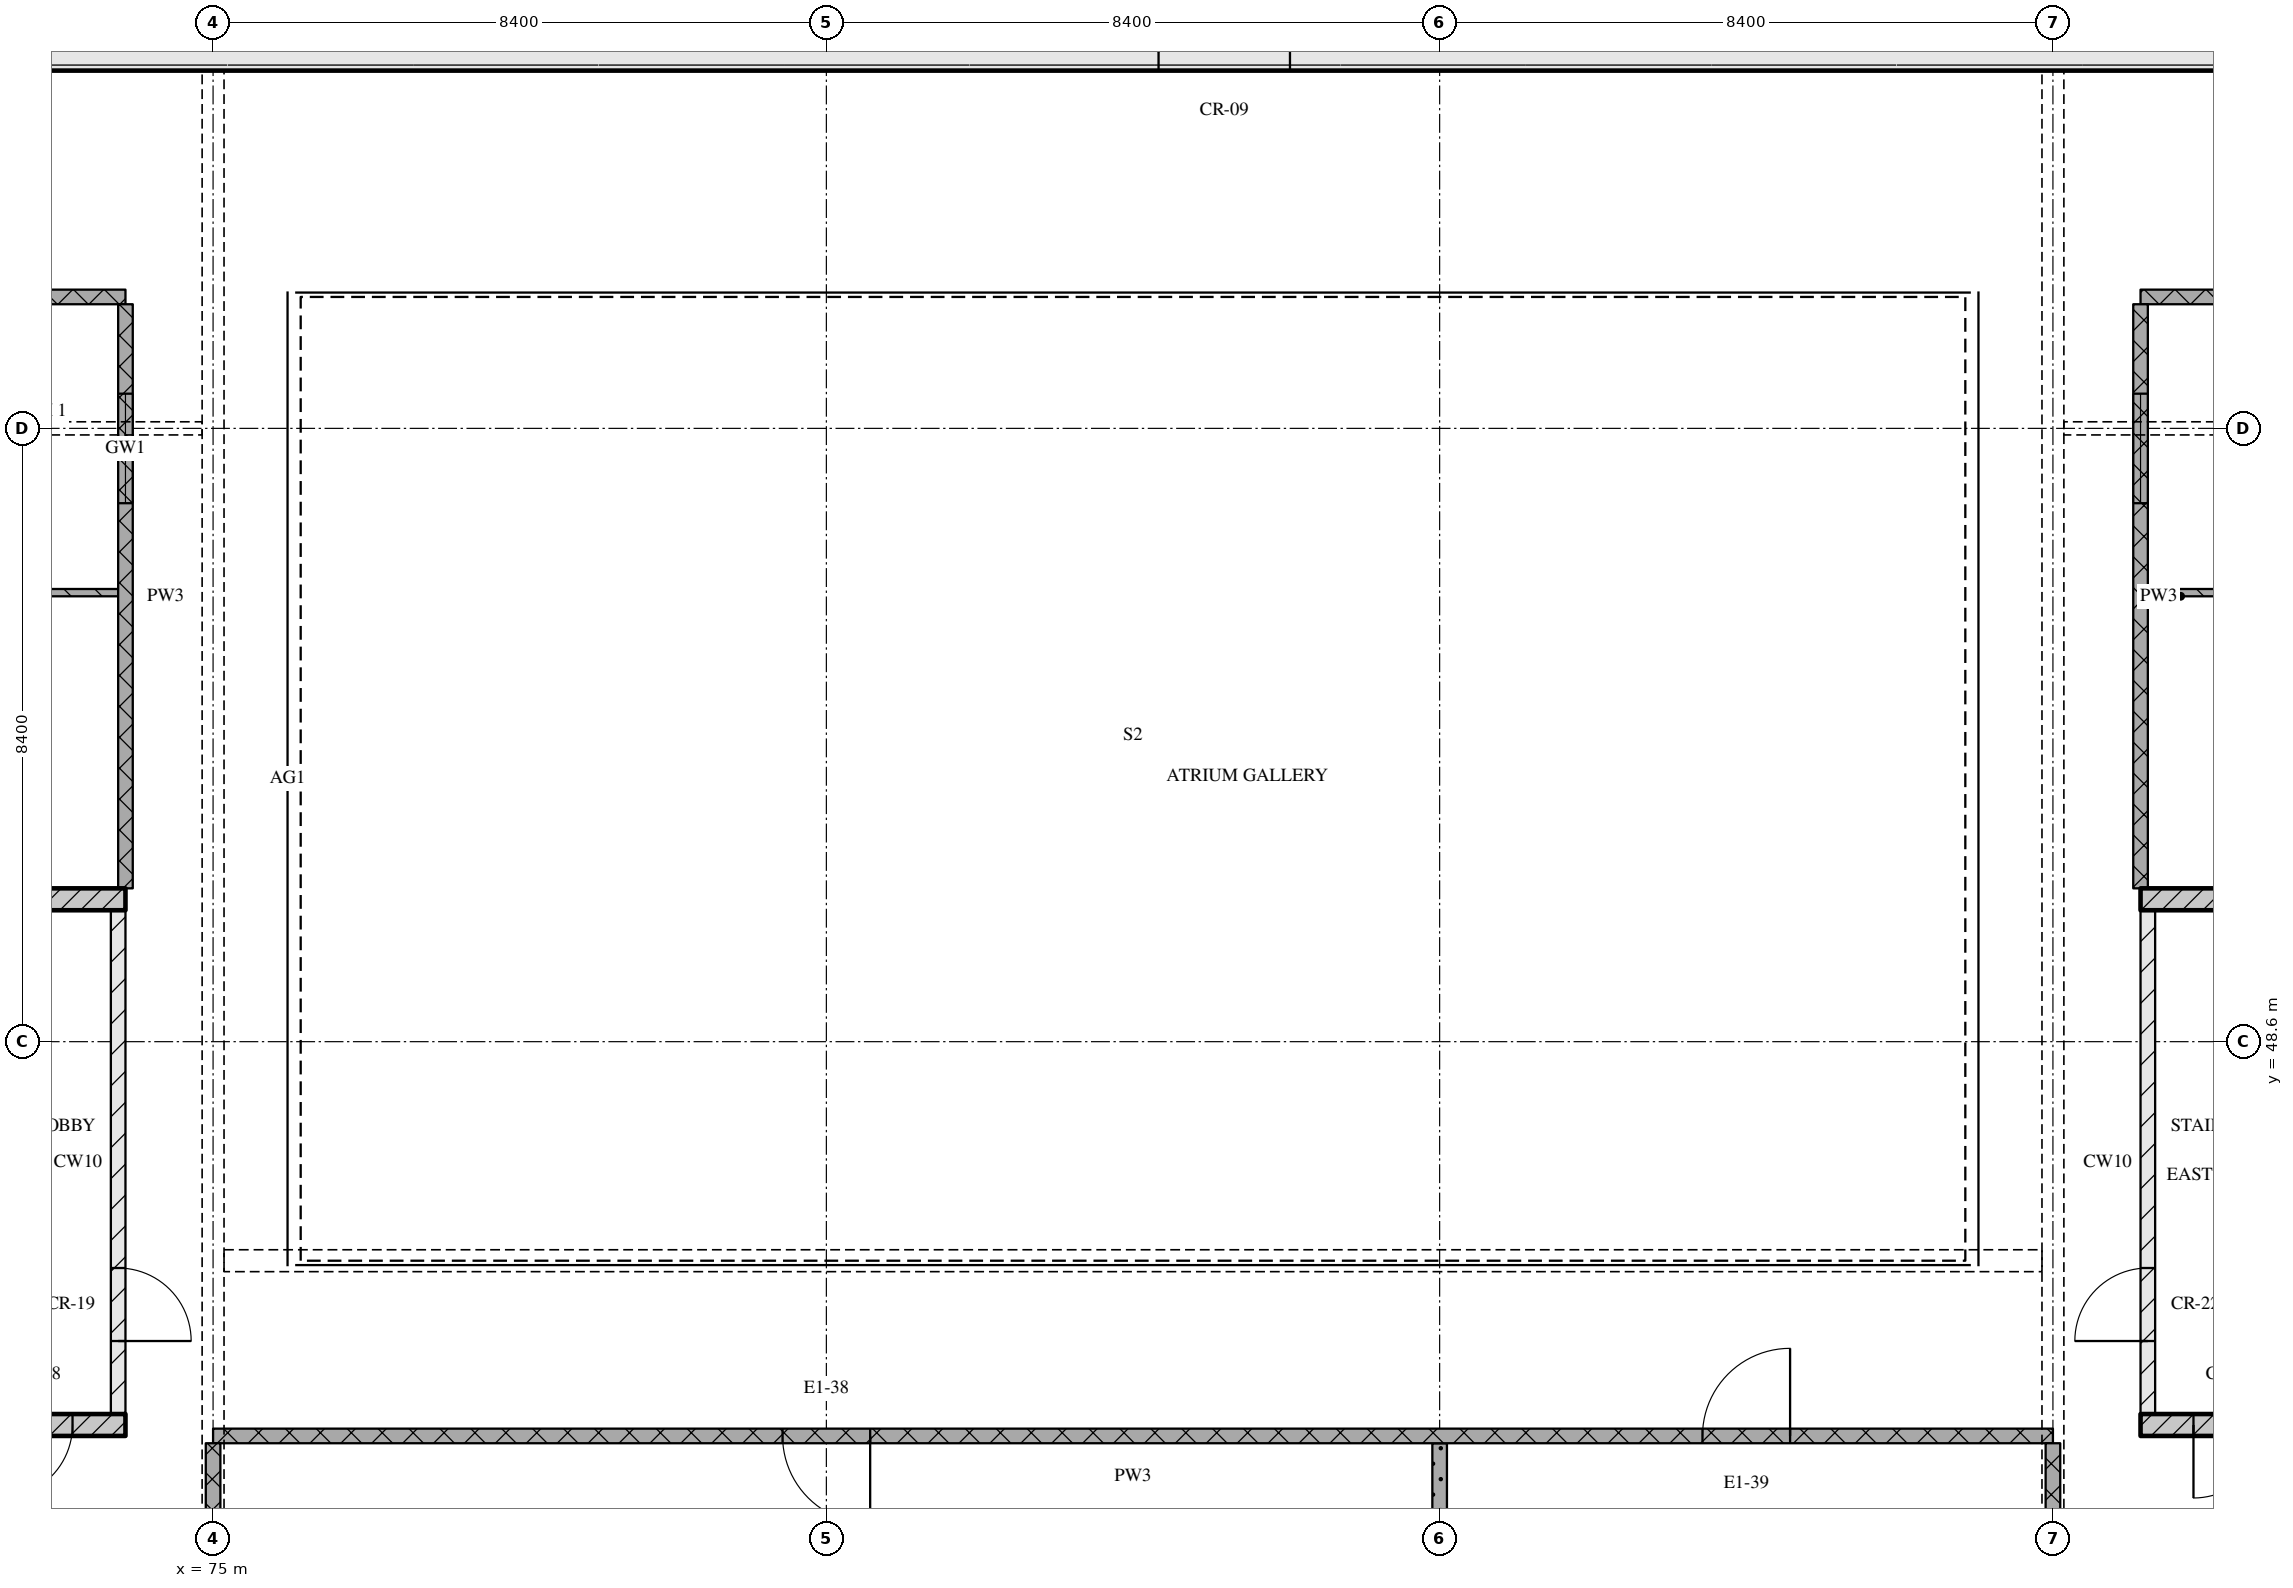
"""IFC4 building model, lengths in metres.
Left out: names, types, materials, properties, quantities, classifications, styles, units other than length and angle.
Written with IfcOpenShell. Run it as: python <this file> out.ifc"""

import sys

from ifc_helpers import new_model, si_unit, direction, frame, frame_2d, origin, place, context, subcontext, project, spatial, rectangle, extrude, element, fill, save


model = new_model("IFC4")
c1 = context("Model", 3, precision=1e-05, world=origin(), true_north=direction((0.0, 1.0)))
c2 = subcontext(c1, "Body", "Model", "MODEL_VIEW")
j1 = project(units=[si_unit("LENGTHUNIT", "METRE"), si_unit("PLANEANGLEUNIT", "RADIAN")], contexts=[c1])
p1 = place(None, origin())
s1 = spatial("IfcSite", under=j1, at=p1, CompositionType="ELEMENT")
p2 = place(p1, origin())
s2 = spatial("IfcBuilding", under=s1, at=p2, CompositionType="ELEMENT")
p3 = place(p2, frame((0.0, 0.0, 263.55)))
s3 = spatial("IfcBuildingStorey", under=s2, at=p3, CompositionType="ELEMENT", Elevation=263.55)
p4 = place(p3, frame((67.3, 62.15, 0.0), z_axis=(0.0, 0.0, 1.0), x_axis=(1.0, 0.0, 0.0)))
e1 = element("IfcWall", 1, at=p4, inside=s3, PredefinedType="SOLIDWALL", context=c2, shape_type="SweptSolid", body=[
    extrude(rectangle(XDim=40.6, YDim=0.5, at=frame_2d((20.3, 0.0))), origin(), (0.0, 0.0, 1.0), 3.32),
])
p5 = place(p4, frame((20.65, 0.0, 0.0)))
e2 = element("IfcOpeningElement", 2, at=p5, cuts=e1, PredefinedType="OPENING", context=c2, shape_type="SweptSolid", body=[
    extrude(rectangle(XDim=1.8, YDim=2.1, at=frame_2d((0.9, 1.05))), frame((0.0, 0.26, 0.0), z_axis=(0.0, -1.0, 0.0), x_axis=(1.0, 0.0, 0.0)), (0.0, 0.0, 1.0), 0.52),
])
p6 = place(p3, frame((68.2, 43.35, 0.0), z_axis=(0.0, 0.0, 1.0), x_axis=(1.0, 0.0, 0.0)))
e3 = element("IfcWall", 3, at=p6, inside=s3, PredefinedType="SOLIDWALL", context=c2, shape_type="SweptSolid", body=[
    extrude(rectangle(XDim=5.6, YDim=0.3, at=frame_2d((2.8, 0.0))), origin(), (0.0, 0.0, 1.0), 3.32),
])
p7 = place(p6, frame((3.875, 0.0, 0.0)))
e4 = element("IfcOpeningElement", 4, at=p7, cuts=e3, PredefinedType="OPENING", context=c2, shape_type="SweptSolid", body=[
    extrude(rectangle(XDim=1.0, YDim=2.1, at=frame_2d((0.5, 1.05))), frame((0.0, 0.16, 0.0), z_axis=(0.0, -1.0, 0.0), x_axis=(1.0, 0.0, 0.0)), (0.0, 0.0, 1.0), 0.32),
])
p8 = place(p3, frame((73.7, 43.5, 0.0), z_axis=(0.0, 0.0, 1.0), x_axis=(0.0, 1.0, 0.0)))
e5 = element("IfcWall", 5, at=p8, inside=s3, PredefinedType="PARTITIONING", context=c2, shape_type="SweptSolid", body=[
    extrude(rectangle(XDim=6.9, YDim=0.2, at=frame_2d((3.45, 0.0))), origin(), (0.0, 0.0, 1.0), 3.32),
])
p9 = place(p8, frame((1.0, 0.0, 0.0)))
e6 = element("IfcOpeningElement", 6, at=p9, cuts=e5, PredefinedType="OPENING", context=c2, shape_type="SweptSolid", body=[
    extrude(rectangle(XDim=1.0, YDim=2.1, at=frame_2d((0.5, 1.05))), frame((0.0, 0.11, 0.0), z_axis=(0.0, -1.0, 0.0), x_axis=(1.0, 0.0, 0.0)), (0.0, 0.0, 1.0), 0.22),
])
p10 = place(p3, frame((68.2, 50.55, 0.0), z_axis=(0.0, 0.0, 1.0), x_axis=(1.0, 0.0, 0.0)))
e7 = element("IfcWall", 7, at=p10, inside=s3, PredefinedType="SOLIDWALL", context=c2, shape_type="SweptSolid", body=[
    extrude(rectangle(XDim=5.6, YDim=0.3, at=frame_2d((2.8, 0.0))), origin(), (0.0, 0.0, 1.0), 3.32),
])
p11 = place(p3, frame((101.4, 43.35, 0.0), z_axis=(0.0, 0.0, 1.0), x_axis=(1.0, 0.0, 0.0)))
e8 = element("IfcWall", 8, at=p11, inside=s3, PredefinedType="SOLIDWALL", context=c2, shape_type="SweptSolid", body=[
    extrude(rectangle(XDim=5.6, YDim=0.3, at=frame_2d((2.8, 0.0))), origin(), (0.0, 0.0, 1.0), 3.32),
])
p12 = place(p11, frame((0.725, 0.0, 0.0)))
e9 = element("IfcOpeningElement", 9, at=p12, cuts=e8, PredefinedType="OPENING", context=c2, shape_type="SweptSolid", body=[
    extrude(rectangle(XDim=1.0, YDim=2.1, at=frame_2d((0.5, 1.05))), frame((0.0, 0.16, 0.0), z_axis=(0.0, -1.0, 0.0), x_axis=(1.0, 0.0, 0.0)), (0.0, 0.0, 1.0), 0.32),
])
p13 = place(p3, frame((101.5, 43.5, 0.0), z_axis=(0.0, 0.0, 1.0), x_axis=(0.0, 1.0, 0.0)))
e10 = element("IfcWall", 10, at=p13, inside=s3, PredefinedType="PARTITIONING", context=c2, shape_type="SweptSolid", body=[
    extrude(rectangle(XDim=6.9, YDim=0.2, at=frame_2d((3.45, 0.0))), origin(), (0.0, 0.0, 1.0), 3.32),
])
p14 = place(p13, frame((1.0, 0.0, 0.0)))
e11 = element("IfcOpeningElement", 11, at=p14, cuts=e10, PredefinedType="OPENING", context=c2, shape_type="SweptSolid", body=[
    extrude(rectangle(XDim=1.0, YDim=2.1, at=frame_2d((0.5, 1.05))), frame((0.0, 0.11, 0.0), z_axis=(0.0, -1.0, 0.0), x_axis=(1.0, 0.0, 0.0)), (0.0, 0.0, 1.0), 0.22),
])
p15 = place(p3, frame((101.4, 50.55, 0.0), z_axis=(0.0, 0.0, 1.0), x_axis=(1.0, 0.0, 0.0)))
e12 = element("IfcWall", 12, at=p15, inside=s3, PredefinedType="SOLIDWALL", context=c2, shape_type="SweptSolid", body=[
    extrude(rectangle(XDim=5.6, YDim=0.3, at=frame_2d((2.8, 0.0))), origin(), (0.0, 0.0, 1.0), 3.32),
])
p16 = place(p3, frame((100.2, 43.2, 0.0), z_axis=(0.0, 0.0, 1.0), x_axis=(-1.0, 0.0, 0.0)))
e13 = element("IfcWall", 13, at=p16, inside=s3, PredefinedType="PARTITIONING", context=c2, shape_type="SweptSolid", body=[
    extrude(rectangle(XDim=25.2, YDim=0.2, at=frame_2d((12.6, 0.0))), origin(), (0.0, 0.0, 1.0), 3.32),
])
p17 = place(p16, frame((3.6, 0.0, 0.0)))
e14 = element("IfcOpeningElement", 14, at=p17, cuts=e13, PredefinedType="OPENING", context=c2, shape_type="SweptSolid", body=[
    extrude(rectangle(XDim=1.2, YDim=2.1, at=frame_2d((0.6, 1.05))), frame((0.0, 0.11, 0.0), z_axis=(0.0, -1.0, 0.0), x_axis=(1.0, 0.0, 0.0)), (0.0, 0.0, 1.0), 0.22),
])
p18 = place(p16, frame((16.2, 0.0, 0.0)))
e15 = element("IfcOpeningElement", 15, at=p18, cuts=e13, PredefinedType="OPENING", context=c2, shape_type="SweptSolid", body=[
    extrude(rectangle(XDim=1.2, YDim=2.1, at=frame_2d((0.6, 1.05))), frame((0.0, 0.11, 0.0), z_axis=(0.0, -1.0, 0.0), x_axis=(1.0, 0.0, 0.0)), (0.0, 0.0, 1.0), 0.22),
])
p19 = place(p3, frame((69.3, 54.75, 0.0), z_axis=(0.0, 0.0, 1.0), x_axis=(1.0, 0.0, 0.0)))
e16 = element("IfcWall", 16, at=p19, inside=s3, PredefinedType="PARTITIONING", context=c2, shape_type="SweptSolid", body=[
    extrude(rectangle(XDim=4.4, YDim=0.1, at=frame_2d((2.2, 0.0))), origin(), (0.0, 0.0, 1.0), 3.32),
])
p20 = place(p3, frame((101.5, 54.75, 0.0), z_axis=(0.0, 0.0, 1.0), x_axis=(1.0, 0.0, 0.0)))
e17 = element("IfcWall", 17, at=p20, inside=s3, PredefinedType="PARTITIONING", context=c2, shape_type="SweptSolid", body=[
    extrude(rectangle(XDim=4.4, YDim=0.1, at=frame_2d((2.2, 0.0))), origin(), (0.0, 0.0, 1.0), 3.32),
])
p21 = place(p20, frame((1.7, 0.0, 0.0)))
e18 = element("IfcOpeningElement", 18, at=p21, cuts=e17, PredefinedType="OPENING", context=c2, shape_type="SweptSolid", body=[
    extrude(rectangle(XDim=0.9, YDim=2.1, at=frame_2d((0.45, 1.05))), frame((0.0, 0.06, 0.0), z_axis=(0.0, -1.0, 0.0), x_axis=(1.0, 0.0, 0.0)), (0.0, 0.0, 1.0), 0.12),
])
for number, where, z_axis, x_axis in (
    (19, (63.0, 58.8, 0.0), (0.0, 0.0, 1.0), (1.0, 0.0, 0.0)),
    (20, (101.4, 58.8, 0.0), (0.0, 0.0, 1.0), (1.0, 0.0, 0.0)),
):
    element("IfcWall", number, at=place(p3, frame(where, z_axis=z_axis, x_axis=x_axis)), inside=s3, PredefinedType="PARTITIONING", context=c2, shape_type="SweptSolid", body=[
        extrude(rectangle(XDim=10.8, YDim=0.2, at=frame_2d((5.4, 0.0))), origin(), (0.0, 0.0, 1.0), 3.32),
    ])
p22 = place(p3, frame((73.8, 58.7, 0.0), z_axis=(0.0, 0.0, 1.0), x_axis=(0.0, -1.0, 0.0)))
e21 = element("IfcWall", 21, at=p22, inside=s3, PredefinedType="PARTITIONING", context=c2, shape_type="SweptSolid", body=[
    extrude(rectangle(XDim=8.0, YDim=0.2, at=frame_2d((4.0, 0.0))), origin(), (0.0, 0.0, 1.0), 3.32),
])
p23 = place(p22, frame((1.225, 0.0, 0.9)))
e22 = element("IfcOpeningElement", 22, at=p23, cuts=e21, PredefinedType="OPENING", context=c2, shape_type="SweptSolid", body=[
    extrude(rectangle(XDim=1.5, YDim=1.5, at=frame_2d((0.75, 0.75))), frame((0.0, 0.11, 0.0), z_axis=(0.0, -1.0, 0.0), x_axis=(1.0, 0.0, 0.0)), (0.0, 0.0, 1.0), 0.22),
])
p24 = place(p3, frame((75.0, 43.1, 0.0), z_axis=(0.0, 0.0, 1.0), x_axis=(0.0, -1.0, 0.0)))
e23 = element("IfcWall", 23, at=p24, inside=s3, PredefinedType="PARTITIONING", context=c2, shape_type="SweptSolid", body=[
    extrude(rectangle(XDim=2.2, YDim=0.2, at=frame_2d((1.1, 0.0))), origin(), (0.0, 0.0, 1.0), 2.53),
])
p25 = place(p3, frame((91.8, 43.1, 0.0), z_axis=(0.0, 0.0, 1.0), x_axis=(0.0, -1.0, 0.0)))
e24 = element("IfcWall", 24, at=p25, inside=s3, PredefinedType="PARTITIONING", context=c2, shape_type="SweptSolid", body=[
    extrude(rectangle(XDim=2.63, YDim=0.2, at=frame_2d((1.315, 0.0))), origin(), (0.0, 0.0, 1.0), 3.32),
])
p26 = place(p3, frame((100.2, 43.1, 0.0), z_axis=(0.0, 0.0, 1.0), x_axis=(0.0, -1.0, 0.0)))
e25 = element("IfcWall", 25, at=p26, inside=s3, PredefinedType="PARTITIONING", context=c2, shape_type="SweptSolid", body=[
    extrude(rectangle(XDim=2.2, YDim=0.2, at=frame_2d((1.1, 0.0))), origin(), (0.0, 0.0, 1.0), 2.53),
])
p27 = place(p3, frame((101.4, 58.7, 0.0), z_axis=(0.0, 0.0, 1.0), x_axis=(0.0, -1.0, 0.0)))
e26 = element("IfcWall", 26, at=p27, inside=s3, PredefinedType="PARTITIONING", context=c2, shape_type="SweptSolid", body=[
    extrude(rectangle(XDim=8.0, YDim=0.2, at=frame_2d((4.0, 0.0))), origin(), (0.0, 0.0, 1.0), 3.32),
])
p28 = place(p27, frame((1.225, 0.0, 0.9)))
e27 = element("IfcOpeningElement", 27, at=p28, cuts=e26, PredefinedType="OPENING", context=c2, shape_type="SweptSolid", body=[
    extrude(rectangle(XDim=1.5, YDim=1.5, at=frame_2d((0.75, 0.75))), frame((0.0, 0.11, 0.0), z_axis=(0.0, -1.0, 0.0), x_axis=(1.0, 0.0, 0.0)), (0.0, 0.0, 1.0), 0.22),
])
p29 = place(p5, origin())
e28 = element("IfcDoor", 28, at=p29, inside=s3, OperationType="DOUBLE_DOOR_SINGLE_SWING", PredefinedType="DOOR", context=c2, shape_type="SweptSolid", body=[
    extrude(rectangle(XDim=1.8, YDim=2.1, at=frame_2d((0.9, 1.05))), frame((0.0, 0.025, 0.0), z_axis=(0.0, -1.0, 0.0), x_axis=(1.0, 0.0, 0.0)), (0.0, 0.0, 1.0), 0.05),
])
fill(e2, e28)
p30 = place(p7, origin())
e29 = element("IfcDoor", 29, at=p30, inside=s3, OperationType="SINGLE_SWING_RIGHT", PredefinedType="DOOR", context=c2, shape_type="SweptSolid", body=[
    extrude(rectangle(XDim=1.0, YDim=2.1, at=frame_2d((0.5, 1.05))), frame((0.0, 0.025, 0.0), z_axis=(0.0, -1.0, 0.0), x_axis=(1.0, 0.0, 0.0)), (0.0, 0.0, 1.0), 0.05),
])
fill(e4, e29)
p31 = place(p9, origin())
e30 = element("IfcDoor", 30, at=p31, inside=s3, OperationType="SINGLE_SWING_RIGHT", PredefinedType="DOOR", context=c2, shape_type="SweptSolid", body=[
    extrude(rectangle(XDim=1.0, YDim=2.1, at=frame_2d((0.5, 1.05))), frame((0.0, 0.025, 0.0), z_axis=(0.0, -1.0, 0.0), x_axis=(1.0, 0.0, 0.0)), (0.0, 0.0, 1.0), 0.05),
])
fill(e6, e30)
p32 = place(p12, origin())
e31 = element("IfcDoor", 31, at=p32, inside=s3, OperationType="SINGLE_SWING_RIGHT", PredefinedType="DOOR", context=c2, shape_type="SweptSolid", body=[
    extrude(rectangle(XDim=1.0, YDim=2.1, at=frame_2d((0.5, 1.05))), frame((0.0, 0.025, 0.0), z_axis=(0.0, -1.0, 0.0), x_axis=(1.0, 0.0, 0.0)), (0.0, 0.0, 1.0), 0.05),
])
fill(e9, e31)
p33 = place(p14, origin())
e32 = element("IfcDoor", 32, at=p33, inside=s3, OperationType="SINGLE_SWING_LEFT", PredefinedType="DOOR", context=c2, shape_type="SweptSolid", body=[
    extrude(rectangle(XDim=1.0, YDim=2.1, at=frame_2d((0.5, 1.05))), frame((0.0, 0.025, 0.0), z_axis=(0.0, -1.0, 0.0), x_axis=(1.0, 0.0, 0.0)), (0.0, 0.0, 1.0), 0.05),
])
fill(e11, e32)
p34 = place(p17, origin())
e33 = element("IfcDoor", 33, at=p34, inside=s3, OperationType="SINGLE_SWING_RIGHT", PredefinedType="DOOR", context=c2, shape_type="SweptSolid", body=[
    extrude(rectangle(XDim=1.2, YDim=2.1, at=frame_2d((0.6, 1.05))), frame((0.0, 0.025, 0.0), z_axis=(0.0, -1.0, 0.0), x_axis=(1.0, 0.0, 0.0)), (0.0, 0.0, 1.0), 0.05),
])
fill(e14, e33)
p35 = place(p18, origin())
e34 = element("IfcDoor", 34, at=p35, inside=s3, OperationType="SINGLE_SWING_LEFT", PredefinedType="DOOR", context=c2, shape_type="SweptSolid", body=[
    extrude(rectangle(XDim=1.2, YDim=2.1, at=frame_2d((0.6, 1.05))), frame((0.0, 0.025, 0.0), z_axis=(0.0, -1.0, 0.0), x_axis=(1.0, 0.0, 0.0)), (0.0, 0.0, 1.0), 0.05),
])
fill(e15, e34)
p36 = place(p23, origin())
e35 = element("IfcWindow", 35, at=p36, inside=s3, PartitioningType="SINGLE_PANEL", PredefinedType="WINDOW", context=c2, shape_type="SweptSolid", body=[
    extrude(rectangle(XDim=1.5, YDim=1.5, at=frame_2d((0.75, 0.75))), frame((0.0, 0.03, 0.0), z_axis=(0.0, -1.0, 0.0), x_axis=(1.0, 0.0, 0.0)), (0.0, 0.0, 1.0), 0.06),
])
fill(e22, e35)
p37 = place(p28, origin())
e36 = element("IfcWindow", 36, at=p37, inside=s3, PartitioningType="SINGLE_PANEL", PredefinedType="WINDOW", context=c2, shape_type="SweptSolid", body=[
    extrude(rectangle(XDim=1.5, YDim=1.5, at=frame_2d((0.75, 0.75))), frame((0.0, 0.03, 0.0), z_axis=(0.0, -1.0, 0.0), x_axis=(1.0, 0.0, 0.0)), (0.0, 0.0, 1.0), 0.06),
])
fill(e27, e36)
save(model, sys.argv[1])
